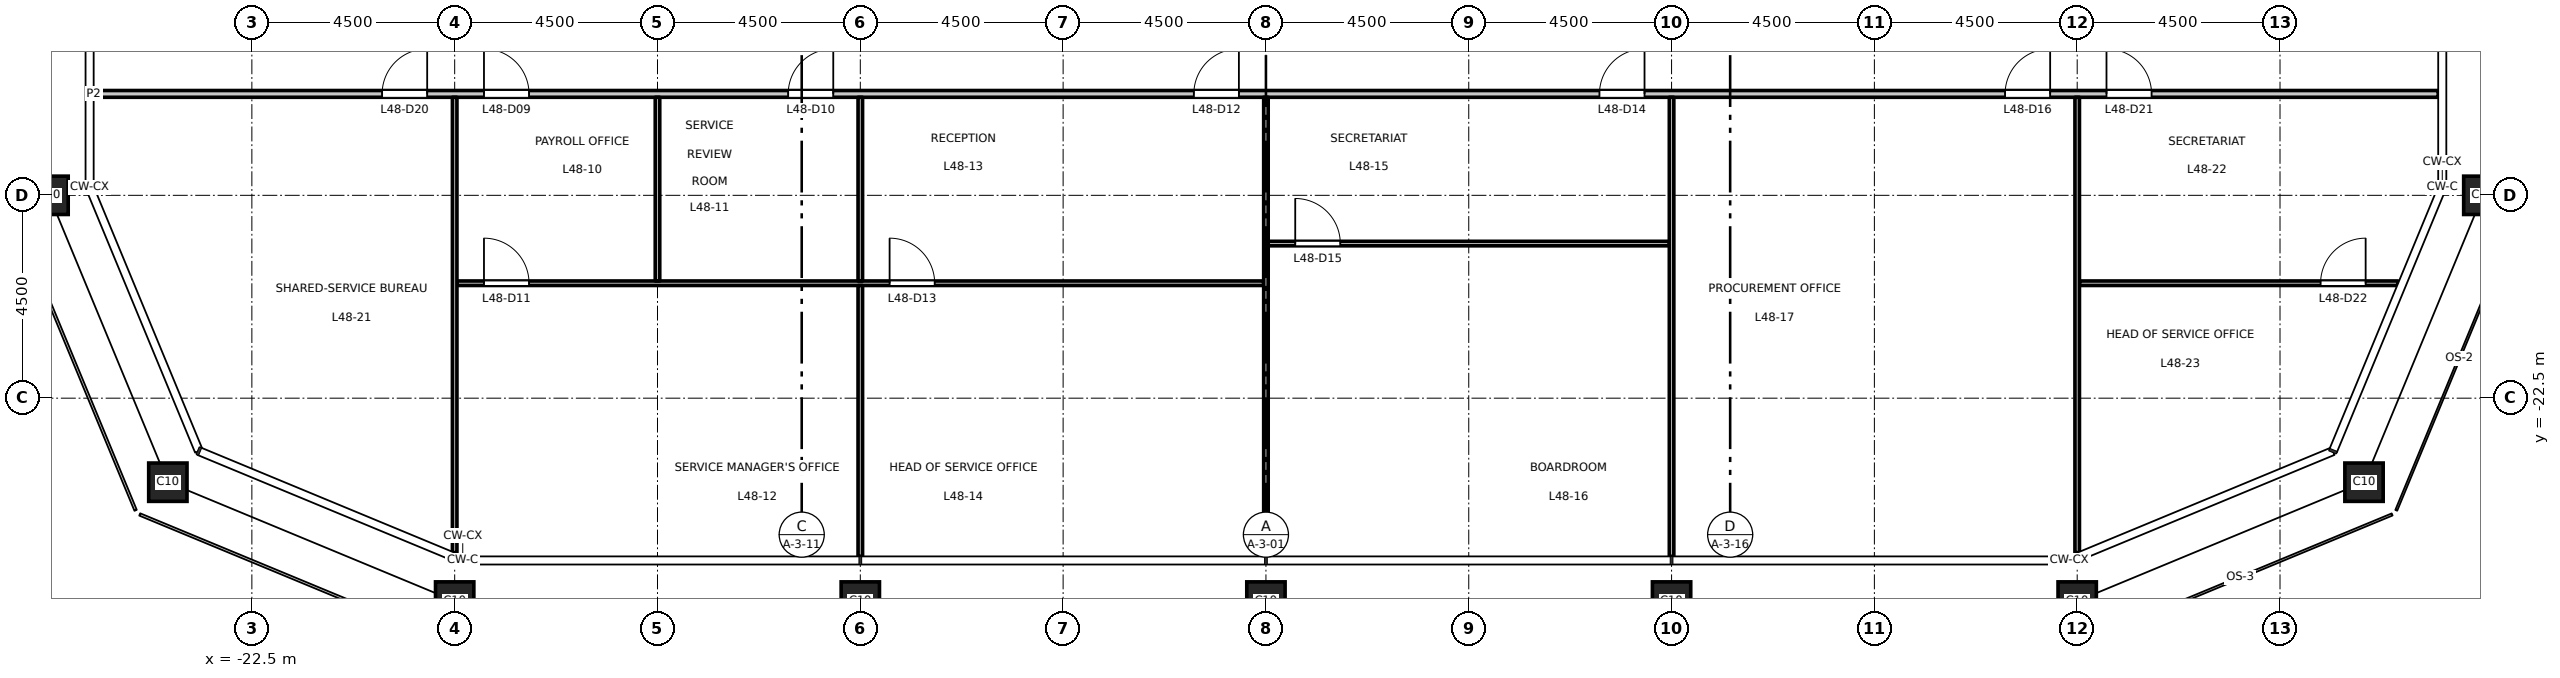
"""IFC4 building model, lengths in metres.
Left out: names, types, materials, properties, quantities, classifications, styles, units other than length and angle.
Written with IfcOpenShell. Run it as: python <this file> out.ifc"""

import sys

from ifc_helpers import new_model, si_unit, direction, frame, frame_2d, origin, origin_2d, place, context, subcontext, project, spatial, rectangle, hollow_rectangle, extrude, element, fill, save


model = new_model("IFC4")
c1 = context("Model", 3, precision=1e-05, world=origin(), true_north=direction((0.0, 1.0)))
c2 = subcontext(c1, "Body", "Model", "MODEL_VIEW")
j1 = project(units=[si_unit("LENGTHUNIT", "METRE"), si_unit("PLANEANGLEUNIT", "RADIAN")], contexts=[c1])
p1 = place(None, origin())
s1 = spatial("IfcSite", under=j1, at=p1, CompositionType="ELEMENT")
p2 = place(p1, origin())
s2 = spatial("IfcBuilding", under=s1, at=p2, CompositionType="ELEMENT")
p3 = place(p2, frame((0.0, 0.0, 224.2)))
s3 = spatial("IfcBuildingStorey", under=s2, at=p3, CompositionType="ELEMENT", Elevation=224.2)
for number, where, z_axis, x_axis in (
    (1, (-18.0, -27.0, 0.0), (0.0, 0.0, 1.0), (1.0, 0.0, 0.0)),
    (2, (-9.0, -27.0, 0.0), (0.0, 0.0, 1.0), (1.0, 0.0, 0.0)),
    (3, (0.0, -27.0, 0.0), (0.0, 0.0, 1.0), (1.0, 0.0, 0.0)),
    (4, (9.0, -27.0, 0.0), (0.0, 0.0, 1.0), (1.0, 0.0, 0.0)),
    (5, (18.0, -27.0, 0.0), (0.0, 0.0, 1.0), (1.0, 0.0, 0.0)),
    (6, (24.364, -24.364, 0.0), (0.0, 0.0, 1.0), (1.0, 0.0, 0.0)),
    (7, (27.0, -18.0, 0.0), (0.0, 0.0, 1.0), (1.0, 0.0, 0.0)),
    (8, (-27.0, -18.0, 0.0), (0.0, 0.0, 1.0), (1.0, 0.0, 0.0)),
    (9, (-24.364, -24.364, 0.0), (0.0, 0.0, 1.0), (1.0, 0.0, 0.0)),
):
    element("IfcColumn", number, at=place(p3, frame(where, z_axis=z_axis, x_axis=x_axis)), inside=s3, PredefinedType="COLUMN", context=c2, shape_type="SweptSolid", body=[
        extrude(hollow_rectangle(XDim=0.85, YDim=0.85, WallThickness=0.05, at=origin_2d()), origin(), (0.0, 0.0, 1.0), 4.5),
    ])
p4 = place(p3, frame((-17.95, -19.95, 0.0), z_axis=(0.0, 0.0, 1.0), x_axis=(1.0, 0.0, 0.0)))
e10 = element("IfcWall", 10, at=p4, inside=s3, PredefinedType="PARTITIONING", context=c2, shape_type="SweptSolid", body=[
    extrude(rectangle(XDim=17.9, YDim=0.1, at=frame_2d((8.95, 0.0))), origin(), (0.0, 0.0, 1.0), 4.35),
])
p5 = place(p4, frame((0.6, 0.0, 0.0)))
e11 = element("IfcOpeningElement", 11, at=p5, cuts=e10, PredefinedType="OPENING", context=c2, shape_type="SweptSolid", body=[
    extrude(rectangle(XDim=1.0, YDim=2.1, at=frame_2d((0.5, 1.05))), frame((0.0, 0.06, 0.0), z_axis=(0.0, -1.0, 0.0), x_axis=(1.0, 0.0, 0.0)), (0.0, 0.0, 1.0), 0.12),
])
p6 = place(p4, frame((9.6, 0.0, 0.0)))
e12 = element("IfcOpeningElement", 12, at=p6, cuts=e10, PredefinedType="OPENING", context=c2, shape_type="SweptSolid", body=[
    extrude(rectangle(XDim=1.0, YDim=2.1, at=frame_2d((0.5, 1.05))), frame((0.0, 0.06, 0.0), z_axis=(0.0, -1.0, 0.0), x_axis=(1.0, 0.0, 0.0)), (0.0, 0.0, 1.0), 0.12),
])
p7 = place(p3, frame((18.05, -19.95, 0.0), z_axis=(0.0, 0.0, 1.0), x_axis=(1.0, 0.0, 0.0)))
e13 = element("IfcWall", 13, at=p7, inside=s3, PredefinedType="PARTITIONING", context=c2, shape_type="SweptSolid", body=[
    extrude(rectangle(XDim=7.071, YDim=0.1, at=frame_2d((3.536, 0.0))), origin(), (0.0, 0.0, 1.0), 4.35),
])
p8 = place(p7, frame((5.35, 0.0, 0.0)))
e14 = element("IfcOpeningElement", 14, at=p8, cuts=e13, PredefinedType="OPENING", context=c2, shape_type="SweptSolid", body=[
    extrude(rectangle(XDim=1.0, YDim=2.1, at=frame_2d((0.5, 1.05))), frame((0.0, 0.06, 0.0), z_axis=(0.0, -1.0, 0.0), x_axis=(1.0, 0.0, 0.0)), (0.0, 0.0, 1.0), 0.12),
])
p9 = place(p3, frame((0.05, -19.07, 0.0), z_axis=(0.0, 0.0, 1.0), x_axis=(1.0, 0.0, 0.0)))
e15 = element("IfcWall", 15, at=p9, inside=s3, PredefinedType="PARTITIONING", context=c2, shape_type="SweptSolid", body=[
    extrude(rectangle(XDim=8.9, YDim=0.1, at=frame_2d((4.45, 0.0))), origin(), (0.0, 0.0, 1.0), 4.35),
])
p10 = place(p9, frame((0.6, 0.0, 0.0)))
e16 = element("IfcOpeningElement", 16, at=p10, cuts=e15, PredefinedType="OPENING", context=c2, shape_type="SweptSolid", body=[
    extrude(rectangle(XDim=1.0, YDim=2.1, at=frame_2d((0.5, 1.05))), frame((0.0, 0.06, 0.0), z_axis=(0.0, -1.0, 0.0), x_axis=(1.0, 0.0, 0.0)), (0.0, 0.0, 1.0), 0.12),
])
p11 = place(p3, frame((-26.01, -15.75, 0.0), z_axis=(0.0, 0.0, 1.0), x_axis=(1.0, 0.0, 0.0)))
e17 = element("IfcWall", 17, at=p11, inside=s3, PredefinedType="PARTITIONING", context=c2, shape_type="SweptSolid", body=[
    extrude(rectangle(XDim=52.02, YDim=0.15, at=frame_2d((26.01, 0.0))), origin(), (0.0, 0.0, 1.0), 4.35),
])
p12 = place(p11, frame((8.66, 0.0, 0.0)))
e18 = element("IfcOpeningElement", 18, at=p12, cuts=e17, PredefinedType="OPENING", context=c2, shape_type="SweptSolid", body=[
    extrude(rectangle(XDim=1.0, YDim=2.1, at=frame_2d((0.5, 1.05))), frame((0.0, 0.085, 0.0), z_axis=(0.0, -1.0, 0.0), x_axis=(1.0, 0.0, 0.0)), (0.0, 0.0, 1.0), 0.17),
])
p13 = place(p11, frame((15.41, 0.0, 0.0)))
e19 = element("IfcOpeningElement", 19, at=p13, cuts=e17, PredefinedType="OPENING", context=c2, shape_type="SweptSolid", body=[
    extrude(rectangle(XDim=1.0, YDim=2.1, at=frame_2d((0.5, 1.05))), frame((0.0, 0.085, 0.0), z_axis=(0.0, -1.0, 0.0), x_axis=(1.0, 0.0, 0.0)), (0.0, 0.0, 1.0), 0.17),
])
p14 = place(p11, frame((24.41, 0.0, 0.0)))
e20 = element("IfcOpeningElement", 20, at=p14, cuts=e17, PredefinedType="OPENING", context=c2, shape_type="SweptSolid", body=[
    extrude(rectangle(XDim=1.0, YDim=2.1, at=frame_2d((0.5, 1.05))), frame((0.0, 0.085, 0.0), z_axis=(0.0, -1.0, 0.0), x_axis=(1.0, 0.0, 0.0)), (0.0, 0.0, 1.0), 0.17),
])
p15 = place(p11, frame((33.41, 0.0, 0.0)))
e21 = element("IfcOpeningElement", 21, at=p15, cuts=e17, PredefinedType="OPENING", context=c2, shape_type="SweptSolid", body=[
    extrude(rectangle(XDim=1.0, YDim=2.1, at=frame_2d((0.5, 1.05))), frame((0.0, 0.085, 0.0), z_axis=(0.0, -1.0, 0.0), x_axis=(1.0, 0.0, 0.0)), (0.0, 0.0, 1.0), 0.17),
])
p16 = place(p11, frame((42.41, 0.0, 0.0)))
e22 = element("IfcOpeningElement", 22, at=p16, cuts=e17, PredefinedType="OPENING", context=c2, shape_type="SweptSolid", body=[
    extrude(rectangle(XDim=1.0, YDim=2.1, at=frame_2d((0.5, 1.05))), frame((0.0, 0.085, 0.0), z_axis=(0.0, -1.0, 0.0), x_axis=(1.0, 0.0, 0.0)), (0.0, 0.0, 1.0), 0.17),
])
p17 = place(p11, frame((6.4, 0.0, 0.0)))
e23 = element("IfcOpeningElement", 23, at=p17, cuts=e17, PredefinedType="OPENING", context=c2, shape_type="SweptSolid", body=[
    extrude(rectangle(XDim=1.0, YDim=2.1, at=frame_2d((0.5, 1.05))), frame((0.0, 0.085, 0.0), z_axis=(0.0, -1.0, 0.0), x_axis=(1.0, 0.0, 0.0)), (0.0, 0.0, 1.0), 0.17),
])
p18 = place(p11, frame((44.66, 0.0, 0.0)))
e24 = element("IfcOpeningElement", 24, at=p18, cuts=e17, PredefinedType="OPENING", context=c2, shape_type="SweptSolid", body=[
    extrude(rectangle(XDim=1.0, YDim=2.1, at=frame_2d((0.5, 1.05))), frame((0.0, 0.085, 0.0), z_axis=(0.0, -1.0, 0.0), x_axis=(1.0, 0.0, 0.0)), (0.0, 0.0, 1.0), 0.17),
])
p19 = place(p3, frame((-18.0, -25.928, 0.0), z_axis=(0.0, 0.0, 1.0), x_axis=(0.0, 1.0, 0.0)))
e25 = element("IfcWall", 25, at=p19, inside=s3, PredefinedType="PARTITIONING", context=c2, shape_type="SweptSolid", body=[
    extrude(rectangle(XDim=10.103, YDim=0.1, at=frame_2d((5.052, 0.0))), origin(), (0.0, 0.0, 1.0), 3.65),
])
p20 = place(p3, frame((-13.5, -19.9, 0.0), z_axis=(0.0, 0.0, 1.0), x_axis=(0.0, 1.0, 0.0)))
e26 = element("IfcWall", 26, at=p20, inside=s3, PredefinedType="PARTITIONING", context=c2, shape_type="SweptSolid", body=[
    extrude(rectangle(XDim=4.075, YDim=0.1, at=frame_2d((2.038, 0.0))), origin(), (0.0, 0.0, 1.0), 4.35),
])
p21 = place(p3, frame((-9.0, -26.01, 0.0), z_axis=(0.0, 0.0, 1.0), x_axis=(0.0, 1.0, 0.0)))
e27 = element("IfcWall", 27, at=p21, inside=s3, PredefinedType="PARTITIONING", context=c2, shape_type="SweptSolid", body=[
    extrude(rectangle(XDim=6.01, YDim=0.1, at=frame_2d((3.005, 0.0))), origin(), (0.0, 0.0, 1.0), 3.65),
])
p22 = place(p3, frame((-9.0, -19.9, 0.0), z_axis=(0.0, 0.0, 1.0), x_axis=(0.0, 1.0, 0.0)))
e28 = element("IfcWall", 28, at=p22, inside=s3, PredefinedType="PARTITIONING", context=c2, shape_type="SweptSolid", body=[
    extrude(rectangle(XDim=4.075, YDim=0.1, at=frame_2d((2.038, 0.0))), origin(), (0.0, 0.0, 1.0), 3.65),
])
p23 = place(p3, frame((0.0, -26.01, 0.0), z_axis=(0.0, 0.0, 1.0), x_axis=(0.0, 1.0, 0.0)))
e29 = element("IfcWall", 29, at=p23, inside=s3, PredefinedType="PARTITIONING", context=c2, shape_type="SweptSolid", body=[
    extrude(rectangle(XDim=10.185, YDim=0.1, at=frame_2d((5.093, 0.0))), origin(), (0.0, 0.0, 1.0), 3.55),
])
p24 = place(p3, frame((9.0, -26.01, 0.0), z_axis=(0.0, 0.0, 1.0), x_axis=(0.0, 1.0, 0.0)))
e30 = element("IfcWall", 30, at=p24, inside=s3, PredefinedType="PARTITIONING", context=c2, shape_type="SweptSolid", body=[
    extrude(rectangle(XDim=10.185, YDim=0.1, at=frame_2d((5.093, 0.0))), origin(), (0.0, 0.0, 1.0), 3.65),
])
p25 = place(p3, frame((18.0, -25.928, 0.0), z_axis=(0.0, 0.0, 1.0), x_axis=(0.0, 1.0, 0.0)))
e31 = element("IfcWall", 31, at=p25, inside=s3, PredefinedType="PARTITIONING", context=c2, shape_type="SweptSolid", body=[
    extrude(rectangle(XDim=10.103, YDim=0.1, at=frame_2d((5.052, 0.0))), origin(), (0.0, 0.0, 1.0), 3.65),
])
p26 = place(p12, origin())
e32 = element("IfcDoor", 32, at=p26, inside=s3, OperationType="SINGLE_SWING_LEFT", PredefinedType="DOOR", context=c2, shape_type="SweptSolid", body=[
    extrude(rectangle(XDim=1.0, YDim=2.1, at=frame_2d((0.5, 1.05))), frame((0.0, 0.025, 0.0), z_axis=(0.0, -1.0, 0.0), x_axis=(1.0, 0.0, 0.0)), (0.0, 0.0, 1.0), 0.05),
])
fill(e18, e32)
p27 = place(p13, origin())
e33 = element("IfcDoor", 33, at=p27, inside=s3, OperationType="SINGLE_SWING_RIGHT", PredefinedType="DOOR", context=c2, shape_type="SweptSolid", body=[
    extrude(rectangle(XDim=1.0, YDim=2.1, at=frame_2d((0.5, 1.05))), frame((0.0, 0.025, 0.0), z_axis=(0.0, -1.0, 0.0), x_axis=(1.0, 0.0, 0.0)), (0.0, 0.0, 1.0), 0.05),
])
fill(e19, e33)
p28 = place(p5, origin())
e34 = element("IfcDoor", 34, at=p28, inside=s3, OperationType="SINGLE_SWING_LEFT", PredefinedType="DOOR", context=c2, shape_type="SweptSolid", body=[
    extrude(rectangle(XDim=1.0, YDim=2.1, at=frame_2d((0.5, 1.05))), frame((0.0, 0.025, 0.0), z_axis=(0.0, -1.0, 0.0), x_axis=(1.0, 0.0, 0.0)), (0.0, 0.0, 1.0), 0.05),
])
fill(e11, e34)
p29 = place(p14, origin())
e35 = element("IfcDoor", 35, at=p29, inside=s3, OperationType="SINGLE_SWING_RIGHT", PredefinedType="DOOR", context=c2, shape_type="SweptSolid", body=[
    extrude(rectangle(XDim=1.0, YDim=2.1, at=frame_2d((0.5, 1.05))), frame((0.0, 0.025, 0.0), z_axis=(0.0, -1.0, 0.0), x_axis=(1.0, 0.0, 0.0)), (0.0, 0.0, 1.0), 0.05),
])
fill(e20, e35)
p30 = place(p6, origin())
e36 = element("IfcDoor", 36, at=p30, inside=s3, OperationType="SINGLE_SWING_LEFT", PredefinedType="DOOR", context=c2, shape_type="SweptSolid", body=[
    extrude(rectangle(XDim=1.0, YDim=2.1, at=frame_2d((0.5, 1.05))), frame((0.0, 0.025, 0.0), z_axis=(0.0, -1.0, 0.0), x_axis=(1.0, 0.0, 0.0)), (0.0, 0.0, 1.0), 0.05),
])
fill(e12, e36)
p31 = place(p15, origin())
e37 = element("IfcDoor", 37, at=p31, inside=s3, OperationType="SINGLE_SWING_RIGHT", PredefinedType="DOOR", context=c2, shape_type="SweptSolid", body=[
    extrude(rectangle(XDim=1.0, YDim=2.1, at=frame_2d((0.5, 1.05))), frame((0.0, 0.025, 0.0), z_axis=(0.0, -1.0, 0.0), x_axis=(1.0, 0.0, 0.0)), (0.0, 0.0, 1.0), 0.05),
])
fill(e21, e37)
p32 = place(p10, origin())
e38 = element("IfcDoor", 38, at=p32, inside=s3, OperationType="SINGLE_SWING_LEFT", PredefinedType="DOOR", context=c2, shape_type="SweptSolid", body=[
    extrude(rectangle(XDim=1.0, YDim=2.1, at=frame_2d((0.5, 1.05))), frame((0.0, 0.025, 0.0), z_axis=(0.0, -1.0, 0.0), x_axis=(1.0, 0.0, 0.0)), (0.0, 0.0, 1.0), 0.05),
])
fill(e16, e38)
p33 = place(p16, origin())
e39 = element("IfcDoor", 39, at=p33, inside=s3, OperationType="SINGLE_SWING_RIGHT", PredefinedType="DOOR", context=c2, shape_type="SweptSolid", body=[
    extrude(rectangle(XDim=1.0, YDim=2.1, at=frame_2d((0.5, 1.05))), frame((0.0, 0.025, 0.0), z_axis=(0.0, -1.0, 0.0), x_axis=(1.0, 0.0, 0.0)), (0.0, 0.0, 1.0), 0.05),
])
fill(e22, e39)
p34 = place(p17, origin())
e40 = element("IfcDoor", 40, at=p34, inside=s3, OperationType="SINGLE_SWING_RIGHT", PredefinedType="DOOR", context=c2, shape_type="SweptSolid", body=[
    extrude(rectangle(XDim=1.0, YDim=2.1, at=frame_2d((0.5, 1.05))), frame((0.0, 0.025, 0.0), z_axis=(0.0, -1.0, 0.0), x_axis=(1.0, 0.0, 0.0)), (0.0, 0.0, 1.0), 0.05),
])
fill(e23, e40)
p35 = place(p18, origin())
e41 = element("IfcDoor", 41, at=p35, inside=s3, OperationType="SINGLE_SWING_LEFT", PredefinedType="DOOR", context=c2, shape_type="SweptSolid", body=[
    extrude(rectangle(XDim=1.0, YDim=2.1, at=frame_2d((0.5, 1.05))), frame((0.0, 0.025, 0.0), z_axis=(0.0, -1.0, 0.0), x_axis=(1.0, 0.0, 0.0)), (0.0, 0.0, 1.0), 0.05),
])
fill(e24, e41)
p36 = place(p8, origin())
e42 = element("IfcDoor", 42, at=p36, inside=s3, OperationType="SINGLE_SWING_RIGHT", PredefinedType="DOOR", context=c2, shape_type="SweptSolid", body=[
    extrude(rectangle(XDim=1.0, YDim=2.1, at=frame_2d((0.5, 1.05))), frame((0.0, 0.025, 0.0), z_axis=(0.0, -1.0, 0.0), x_axis=(1.0, 0.0, 0.0)), (0.0, 0.0, 1.0), 0.05),
])
fill(e14, e42)
save(model, sys.argv[1])
